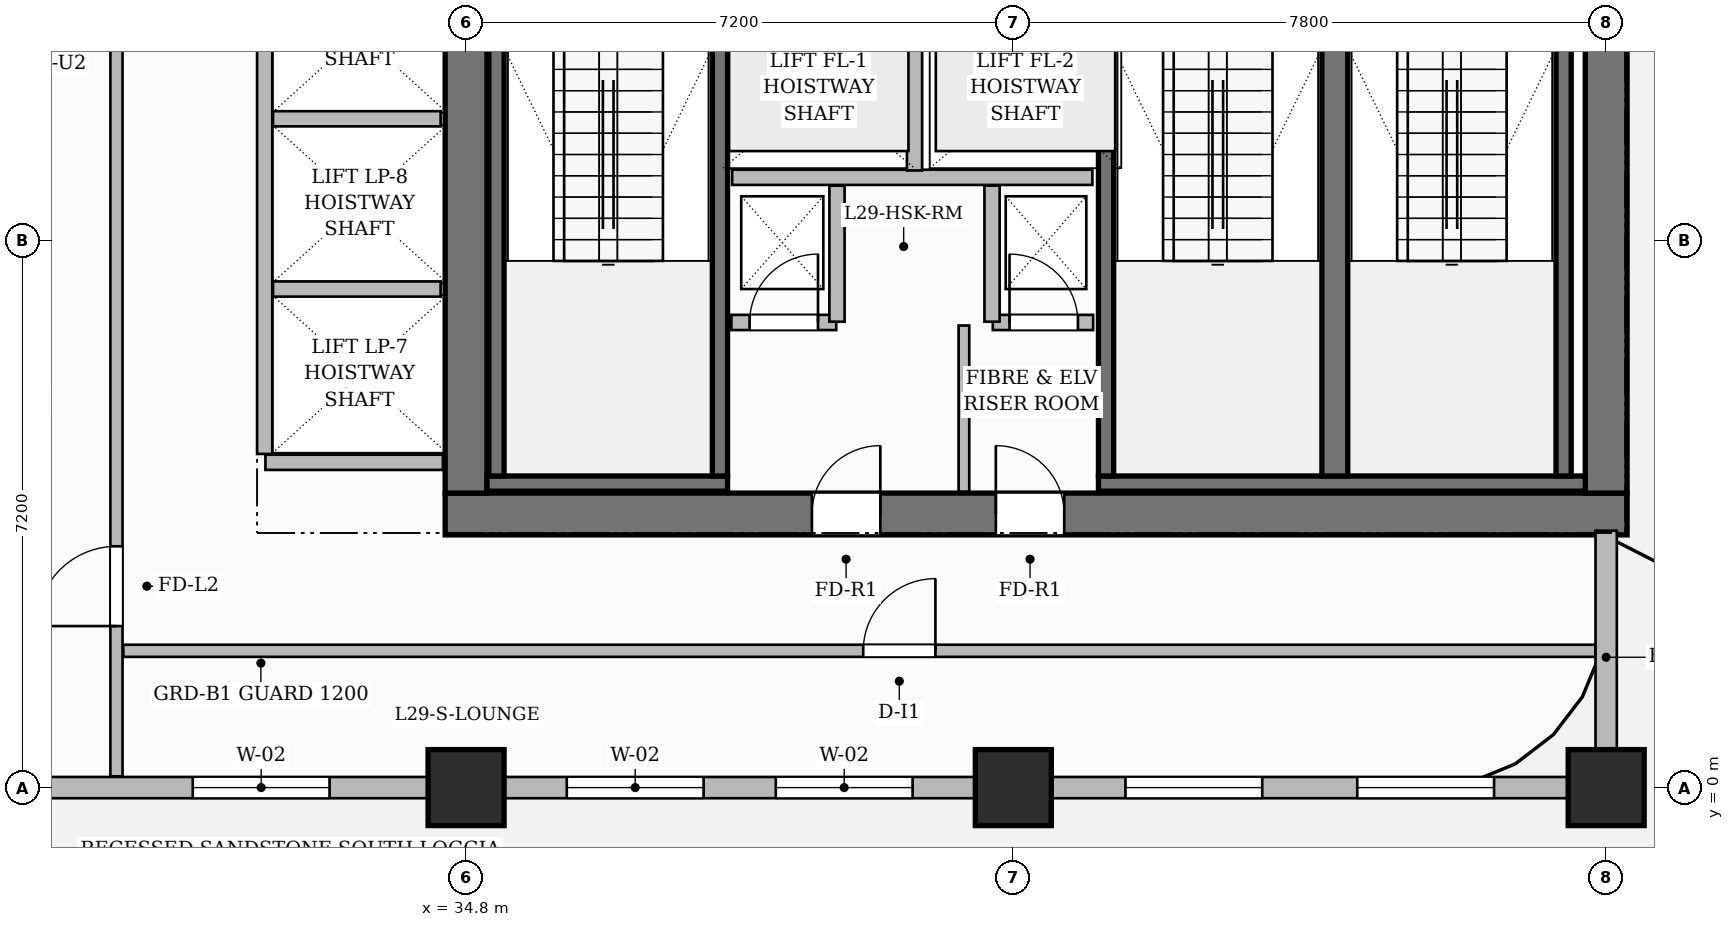
"""IFC4 building model, lengths in metres.
Left out: names, types, materials, properties, quantities, classifications, styles, units other than length and angle.
Written with IfcOpenShell. Run it as: python <this file> out.ifc"""

import sys

from ifc_helpers import new_model, si_unit, direction, frame, frame_2d, origin, origin_2d, place, context, subcontext, project, spatial, rectangle, extrude, source, transform, mapped, element, fill, save


model = new_model("IFC4")
c1 = context("Model", 3, precision=1e-05, world=origin(), true_north=direction((0.0, 1.0)))
c2 = subcontext(c1, "Body", "Model", "MODEL_VIEW")
j1 = project(units=[si_unit("LENGTHUNIT", "METRE"), si_unit("PLANEANGLEUNIT", "RADIAN")], contexts=[c1])
p1 = place(None, origin())
s1 = spatial("IfcSite", under=j1, at=p1, CompositionType="ELEMENT")
p2 = place(p1, origin())
s2 = spatial("IfcBuilding", under=s1, at=p2, CompositionType="ELEMENT")
p3 = place(p2, frame((0.0, 0.0, 119.2)))
s3 = spatial("IfcBuildingStorey", under=s2, at=p3, CompositionType="ELEMENT", Elevation=119.2)
p4 = place(p3, frame((34.525, 3.6, 0.0), z_axis=(0.0, 0.0, 1.0), x_axis=(1.0, 0.0, 0.0)))
e1 = element("IfcWall", 1, at=p4, inside=s3, PredefinedType="SHEAR", context=c2, shape_type="SweptSolid", body=[
    extrude(rectangle(XDim=15.55, YDim=0.55, at=frame_2d((7.775, 0.0))), origin(), (0.0, 0.0, 1.0), 3.7),
])
p5 = place(p4, frame((4.825, 0.0, 0.0)))
e2 = element("IfcOpeningElement", 2, at=p5, cuts=e1, PredefinedType="OPENING", context=c2, shape_type="SweptSolid", body=[
    extrude(rectangle(XDim=0.9, YDim=2.1, at=frame_2d((0.45, 1.05))), frame((0.0, 0.285, 0.0), z_axis=(0.0, -1.0, 0.0), x_axis=(1.0, 0.0, 0.0)), (0.0, 0.0, 1.0), 0.57),
])
p6 = place(p4, frame((7.245, 0.0, 0.0)))
e3 = element("IfcOpeningElement", 3, at=p6, cuts=e1, PredefinedType="OPENING", context=c2, shape_type="SweptSolid", body=[
    extrude(rectangle(XDim=0.9, YDim=2.1, at=frame_2d((0.45, 1.05))), frame((0.0, 0.285, 0.0), z_axis=(0.0, -1.0, 0.0), x_axis=(1.0, 0.0, 0.0)), (0.0, 0.0, 1.0), 0.57),
])
for number, where, z_axis, x_axis in (
    (4, (34.8, 3.875, 0.0), (0.0, 0.0, 1.0), (0.0, 1.0, 0.0)),
    (5, (49.8, 3.875, 0.0), (0.0, 0.0, 1.0), (0.0, 1.0, 0.0)),
):
    element("IfcWall", number, at=place(p3, frame(where, z_axis=z_axis, x_axis=x_axis)), inside=s3, PredefinedType="SHEAR", context=c2, shape_type="SweptSolid", body=[
        extrude(rectangle(XDim=10.25, YDim=0.55, at=frame_2d((5.125, 0.0))), origin(), (0.0, 0.0, 1.0), 3.7),
    ])
m1 = source(origin(), c2, "Body", "SweptSolid", [
    extrude(rectangle(XDim=1.0, YDim=1.0, at=origin_2d()), origin(), (0.0, 0.0, 1.0), 3.7),
])
for number, where, z_axis, x_axis in (
    (6, (34.8, 0.0, 0.0), (0.0, 0.0, 1.0), (1.0, 0.0, 0.0)),
    (7, (42.0, 0.0, 0.0), (0.0, 0.0, 1.0), (1.0, 0.0, 0.0)),
    (8, (49.8, 0.0, 0.0), (0.0, 0.0, 1.0), (1.0, 0.0, 0.0)),
):
    element("IfcColumn", number, at=place(p3, frame(where, z_axis=z_axis, x_axis=x_axis)), inside=s3, PredefinedType="COLUMN", context=c2, shape_type="MappedRepresentation", body=[
        mapped(m1, transform((0.0, 0.0, 0.0), scale=1.0)),
    ])
p7 = place(p3, frame((35.075, 4.0, 0.0), z_axis=(0.0, 0.0, 1.0), x_axis=(1.0, 0.0, 0.0)))
e9 = element("IfcWall", 9, at=p7, inside=s3, PredefinedType="SHEAR", context=c2, shape_type="SweptSolid", body=[
    extrude(rectangle(XDim=3.165, YDim=0.2, at=frame_2d((1.583, 0.0))), origin(), (0.0, 0.0, 1.0), 3.7),
])
for number, where, z_axis, x_axis in (
    (10, (35.2, 4.1, 0.0), (0.0, 0.0, 1.0), (0.0, 1.0, 0.0)),
    (11, (38.14, 4.1, 0.0), (0.0, 0.0, 1.0), (0.0, 1.0, 0.0)),
):
    element("IfcWall", number, at=place(p3, frame(where, z_axis=z_axis, x_axis=x_axis)), inside=s3, PredefinedType="SHEAR", context=c2, shape_type="SweptSolid", body=[
        extrude(rectangle(XDim=6.95, YDim=0.2, at=frame_2d((3.475, 0.0))), origin(), (0.0, 0.0, 1.0), 3.7),
    ])
p8 = place(p3, frame((43.12, 4.0, 0.0), z_axis=(0.0, 0.0, 1.0), x_axis=(1.0, 0.0, 0.0)))
e12 = element("IfcWall", 12, at=p8, inside=s3, PredefinedType="SHEAR", context=c2, shape_type="SweptSolid", body=[
    extrude(rectangle(XDim=6.405, YDim=0.2, at=frame_2d((3.202, 0.0))), origin(), (0.0, 0.0, 1.0), 3.7),
])
p9 = place(p3, frame((43.22, 4.1, 0.0), z_axis=(0.0, 0.0, 1.0), x_axis=(0.0, 1.0, 0.0)))
e13 = element("IfcWall", 13, at=p9, inside=s3, PredefinedType="SHEAR", context=c2, shape_type="SweptSolid", body=[
    extrude(rectangle(XDim=6.95, YDim=0.2, at=frame_2d((3.475, 0.0))), origin(), (0.0, 0.0, 1.0), 3.7),
])
p10 = place(p3, frame((46.23, 4.1, 0.0), z_axis=(0.0, 0.0, 1.0), x_axis=(0.0, 1.0, 0.0)))
e14 = element("IfcWall", 14, at=p10, inside=s3, PredefinedType="SHEAR", context=c2, shape_type="SweptSolid", body=[
    extrude(rectangle(XDim=6.95, YDim=0.34, at=frame_2d((3.475, 0.0))), origin(), (0.0, 0.0, 1.0), 3.7),
])
p11 = place(p3, frame((49.24, 4.1, 0.0), z_axis=(0.0, 0.0, 1.0), x_axis=(0.0, 1.0, 0.0)))
e15 = element("IfcWall", 15, at=p11, inside=s3, PredefinedType="SHEAR", context=c2, shape_type="SweptSolid", body=[
    extrude(rectangle(XDim=6.95, YDim=0.2, at=frame_2d((3.475, 0.0))), origin(), (0.0, 0.0, 1.0), 3.7),
])
p12 = place(p3, frame((38.3, 8.03, 0.0), z_axis=(0.0, 0.0, 1.0), x_axis=(1.0, 0.0, 0.0)))
e16 = element("IfcWall", 16, at=p12, inside=s3, PredefinedType="PARTITIONING", context=c2, shape_type="SweptSolid", body=[
    extrude(rectangle(XDim=4.74, YDim=0.2, at=frame_2d((2.37, 0.0))), origin(), (0.0, 0.0, 1.0), 3.45),
])
p13 = place(p3, frame((40.7, 8.12, 0.0), z_axis=(0.0, 0.0, 1.0), x_axis=(0.0, 1.0, 0.0)))
e17 = element("IfcWall", 17, at=p13, inside=s3, PredefinedType="PARTITIONING", context=c2, shape_type="SweptSolid", body=[
    extrude(rectangle(XDim=2.18, YDim=0.2, at=frame_2d((1.09, 0.0))), origin(), (0.0, 0.0, 1.0), 3.45),
])
p14 = place(p3, frame((38.29, 6.12, 0.0), z_axis=(0.0, 0.0, 1.0), x_axis=(1.0, 0.0, 0.0)))
e18 = element("IfcWall", 18, at=p14, inside=s3, PredefinedType="PARTITIONING", context=c2, shape_type="SweptSolid", body=[
    extrude(rectangle(XDim=1.38, YDim=0.2, at=frame_2d((0.69, 0.0))), origin(), (0.0, 0.0, 1.0), 3.45),
])
p15 = place(p14, frame((0.24, 0.0, 0.0)))
e19 = element("IfcOpeningElement", 19, at=p15, cuts=e18, PredefinedType="OPENING", context=c2, shape_type="SweptSolid", body=[
    extrude(rectangle(XDim=0.9, YDim=2.1, at=frame_2d((0.45, 1.05))), frame((0.0, 0.11, 0.0), z_axis=(0.0, -1.0, 0.0), x_axis=(1.0, 0.0, 0.0)), (0.0, 0.0, 1.0), 0.22),
])
p16 = place(p3, frame((39.68, 6.13, 0.0), z_axis=(0.0, 0.0, 1.0), x_axis=(0.0, 1.0, 0.0)))
e20 = element("IfcWall", 20, at=p16, inside=s3, PredefinedType="PARTITIONING", context=c2, shape_type="SweptSolid", body=[
    extrude(rectangle(XDim=1.79, YDim=0.2, at=frame_2d((0.895, 0.0))), origin(), (0.0, 0.0, 1.0), 3.45),
])
p17 = place(p3, frame((41.73, 6.12, 0.0), z_axis=(0.0, 0.0, 1.0), x_axis=(1.0, 0.0, 0.0)))
e21 = element("IfcWall", 21, at=p17, inside=s3, PredefinedType="PARTITIONING", context=c2, shape_type="SweptSolid", body=[
    extrude(rectangle(XDim=1.32, YDim=0.2, at=frame_2d((0.66, 0.0))), origin(), (0.0, 0.0, 1.0), 3.45),
])
p18 = place(p17, frame((0.22, 0.0, 0.0)))
e22 = element("IfcOpeningElement", 22, at=p18, cuts=e21, PredefinedType="OPENING", context=c2, shape_type="SweptSolid", body=[
    extrude(rectangle(XDim=0.9, YDim=2.1, at=frame_2d((0.45, 1.05))), frame((0.0, 0.11, 0.0), z_axis=(0.0, -1.0, 0.0), x_axis=(1.0, 0.0, 0.0)), (0.0, 0.0, 1.0), 0.22),
])
p19 = place(p3, frame((41.72, 6.13, 0.0), z_axis=(0.0, 0.0, 1.0), x_axis=(0.0, 1.0, 0.0)))
e23 = element("IfcWall", 23, at=p19, inside=s3, PredefinedType="PARTITIONING", context=c2, shape_type="SweptSolid", body=[
    extrude(rectangle(XDim=1.79, YDim=0.2, at=frame_2d((0.895, 0.0))), origin(), (0.0, 0.0, 1.0), 3.45),
])
p20 = place(p3, frame((41.35, 3.895, 0.0), z_axis=(0.0, 0.0, 1.0), x_axis=(0.0, 1.0, 0.0)))
e24 = element("IfcWall", 24, at=p20, inside=s3, PredefinedType="PARTITIONING", context=c2, shape_type="SweptSolid", body=[
    extrude(rectangle(XDim=2.185, YDim=0.14, at=frame_2d((1.093, 0.0))), origin(), (0.0, 0.0, 1.0), 3.45),
])
p21 = place(p3, frame((32.16, 4.28, 0.0), z_axis=(0.0, 0.0, 1.0), x_axis=(1.0, 0.0, 0.0)))
e25 = element("IfcWall", 25, at=p21, inside=s3, PredefinedType="PARTITIONING", context=c2, shape_type="SweptSolid", body=[
    extrude(rectangle(XDim=2.335, YDim=0.2, at=frame_2d((1.167, 0.0))), origin(), (0.0, 0.0, 1.0), 3.45),
])
p22 = place(p3, frame((32.15, 4.39, 0.0), z_axis=(0.0, 0.0, 1.0), x_axis=(0.0, 1.0, 0.0)))
e26 = element("IfcWall", 26, at=p22, inside=s3, PredefinedType="PARTITIONING", context=c2, shape_type="SweptSolid", body=[
    extrude(rectangle(XDim=8.82, YDim=0.2, at=frame_2d((4.41, 0.0))), origin(), (0.0, 0.0, 1.0), 3.45),
])
for number, where, z_axis, x_axis in (
    (27, (32.26, 6.56, 0.0), (0.0, 0.0, 1.0), (1.0, 0.0, 0.0)),
    (28, (32.26, 8.8, 0.0), (0.0, 0.0, 1.0), (1.0, 0.0, 0.0)),
):
    element("IfcWall", number, at=place(p3, frame(where, z_axis=z_axis, x_axis=x_axis)), inside=s3, PredefinedType="PARTITIONING", context=c2, shape_type="SweptSolid", body=[
        extrude(rectangle(XDim=2.205, YDim=0.2, at=frame_2d((1.103, 0.0))), origin(), (0.0, 0.0, 1.0), 3.45),
    ])
p23 = place(p3, frame((30.2, 0.148, 0.0), z_axis=(0.0, 0.0, 1.0), x_axis=(0.0, 1.0, 0.0)))
e29 = element("IfcWall", 29, at=p23, inside=s3, PredefinedType="PARTITIONING", context=c2, shape_type="SweptSolid", body=[
    extrude(rectangle(XDim=10.112, YDim=0.16, at=frame_2d((5.056, 0.0))), origin(), (0.0, 0.0, 1.0), 3.45),
])
p24 = place(p23, frame((1.977, 0.0, 0.0)))
e30 = element("IfcOpeningElement", 30, at=p24, cuts=e29, PredefinedType="OPENING", context=c2, shape_type="SweptSolid", body=[
    extrude(rectangle(XDim=1.05, YDim=2.15, at=frame_2d((0.525, 1.075))), frame((0.0, 0.09, 0.0), z_axis=(0.0, -1.0, 0.0), x_axis=(1.0, 0.0, 0.0)), (0.0, 0.0, 1.0), 0.18),
])
p25 = place(p3, frame((30.29, 1.8, 0.0), z_axis=(0.0, 0.0, 1.0), x_axis=(1.0, 0.0, 0.0)))
e31 = element("IfcWall", 31, at=p25, inside=s3, PredefinedType="PARTITIONING", context=c2, shape_type="SweptSolid", body=[
    extrude(rectangle(XDim=19.37, YDim=0.16, at=frame_2d((9.685, 0.0))), origin(), (0.0, 0.0, 1.0), 3.45),
])
p26 = place(p25, frame((9.735, 0.0, 0.0)))
e32 = element("IfcOpeningElement", 32, at=p26, cuts=e31, PredefinedType="OPENING", context=c2, shape_type="SweptSolid", body=[
    extrude(rectangle(XDim=0.95, YDim=2.15, at=frame_2d((0.475, 1.075))), frame((0.0, 0.09, 0.0), z_axis=(0.0, -1.0, 0.0), x_axis=(1.0, 0.0, 0.0)), (0.0, 0.0, 1.0), 0.18),
])
p27 = place(p3, frame((14.4, 0.0, 0.0), z_axis=(0.0, 0.0, 1.0), x_axis=(1.0, 0.0, 0.0)))
e33 = element("IfcWall", 33, at=p27, inside=s3, PredefinedType="SOLIDWALL", context=c2, shape_type="SweptSolid", body=[
    extrude(rectangle(XDim=35.4, YDim=0.28, at=frame_2d((17.7, 0.0))), origin(), (0.0, 0.0, 1.0), 2.935),
])
p28 = place(p27, frame((0.85, 0.0, 0.0)))
e34 = element("IfcOpeningElement", 34, at=p28, cuts=e33, PredefinedType="OPENING", context=c2, shape_type="SweptSolid", body=[
    extrude(rectangle(XDim=1.2, YDim=2.2, at=frame_2d((0.6, 1.1))), frame((0.0, 0.15, 0.0), z_axis=(0.0, -1.0, 0.0), x_axis=(1.0, 0.0, 0.0)), (0.0, 0.0, 1.0), 0.3),
])
p29 = place(p27, frame((2.671, 0.0, 0.8)))
e35 = element("IfcOpeningElement", 35, at=p29, cuts=e33, PredefinedType="OPENING", context=c2, shape_type="SweptSolid", body=[
    extrude(rectangle(XDim=0.95, YDim=1.75, at=frame_2d((0.475, 0.875))), frame((0.0, 0.15, 0.0), z_axis=(0.0, -1.0, 0.0), x_axis=(1.0, 0.0, 0.0)), (0.0, 0.0, 1.0), 0.3),
])
p30 = place(p27, frame((4.479, 0.0, 0.8)))
e36 = element("IfcOpeningElement", 36, at=p30, cuts=e33, PredefinedType="OPENING", context=c2, shape_type="SweptSolid", body=[
    extrude(rectangle(XDim=1.4, YDim=1.85, at=frame_2d((0.7, 0.925))), frame((0.0, 0.15, 0.0), z_axis=(0.0, -1.0, 0.0), x_axis=(1.0, 0.0, 0.0)), (0.0, 0.0, 1.0), 0.3),
])
p31 = place(p27, frame((8.181, 0.0, 0.8)))
e37 = element("IfcOpeningElement", 37, at=p31, cuts=e33, PredefinedType="OPENING", context=c2, shape_type="SweptSolid", body=[
    extrude(rectangle(XDim=0.95, YDim=1.75, at=frame_2d((0.475, 0.875))), frame((0.0, 0.15, 0.0), z_axis=(0.0, -1.0, 0.0), x_axis=(1.0, 0.0, 0.0)), (0.0, 0.0, 1.0), 0.3),
])
p32 = place(p27, frame((9.845, 0.0, 0.8)))
e38 = element("IfcOpeningElement", 38, at=p32, cuts=e33, PredefinedType="OPENING", context=c2, shape_type="SweptSolid", body=[
    extrude(rectangle(XDim=1.8, YDim=1.85, at=frame_2d((0.9, 0.925))), frame((0.0, 0.15, 0.0), z_axis=(0.0, -1.0, 0.0), x_axis=(1.0, 0.0, 0.0)), (0.0, 0.0, 1.0), 0.3),
])
p33 = place(p27, frame((12.414, 0.0, 0.8)))
e39 = element("IfcOpeningElement", 39, at=p33, cuts=e33, PredefinedType="OPENING", context=c2, shape_type="SweptSolid", body=[
    extrude(rectangle(XDim=0.95, YDim=1.75, at=frame_2d((0.475, 0.875))), frame((0.0, 0.15, 0.0), z_axis=(0.0, -1.0, 0.0), x_axis=(1.0, 0.0, 0.0)), (0.0, 0.0, 1.0), 0.3),
])
p34 = place(p27, frame((16.804, 0.0, 0.8)))
e40 = element("IfcOpeningElement", 40, at=p34, cuts=e33, PredefinedType="OPENING", context=c2, shape_type="SweptSolid", body=[
    extrude(rectangle(XDim=1.8, YDim=1.85, at=frame_2d((0.9, 0.925))), frame((0.0, 0.15, 0.0), z_axis=(0.0, -1.0, 0.0), x_axis=(1.0, 0.0, 0.0)), (0.0, 0.0, 1.0), 0.3),
])
p35 = place(p27, frame((21.725, 0.0, 0.8)))
e41 = element("IfcOpeningElement", 41, at=p35, cuts=e33, PredefinedType="OPENING", context=c2, shape_type="SweptSolid", body=[
    extrude(rectangle(XDim=1.8, YDim=1.85, at=frame_2d((0.9, 0.925))), frame((0.0, 0.15, 0.0), z_axis=(0.0, -1.0, 0.0), x_axis=(1.0, 0.0, 0.0)), (0.0, 0.0, 1.0), 0.3),
])
p36 = place(p27, frame((24.475, 0.0, 0.8)))
e42 = element("IfcOpeningElement", 42, at=p36, cuts=e33, PredefinedType="OPENING", context=c2, shape_type="SweptSolid", body=[
    extrude(rectangle(XDim=1.8, YDim=1.85, at=frame_2d((0.9, 0.925))), frame((0.0, 0.15, 0.0), z_axis=(0.0, -1.0, 0.0), x_axis=(1.0, 0.0, 0.0)), (0.0, 0.0, 1.0), 0.3),
])
p37 = place(p27, frame((29.075, 0.0, 0.8)))
e43 = element("IfcOpeningElement", 43, at=p37, cuts=e33, PredefinedType="OPENING", context=c2, shape_type="SweptSolid", body=[
    extrude(rectangle(XDim=1.8, YDim=1.85, at=frame_2d((0.9, 0.925))), frame((0.0, 0.15, 0.0), z_axis=(0.0, -1.0, 0.0), x_axis=(1.0, 0.0, 0.0)), (0.0, 0.0, 1.0), 0.3),
])
p38 = place(p27, frame((32.125, 0.0, 0.8)))
e44 = element("IfcOpeningElement", 44, at=p38, cuts=e33, PredefinedType="OPENING", context=c2, shape_type="SweptSolid", body=[
    extrude(rectangle(XDim=1.8, YDim=1.85, at=frame_2d((0.9, 0.925))), frame((0.0, 0.15, 0.0), z_axis=(0.0, -1.0, 0.0), x_axis=(1.0, 0.0, 0.0)), (0.0, 0.0, 1.0), 0.3),
])
p39 = place(p3, frame((49.8, 0.05, 0.0), z_axis=(0.0, 0.0, 1.0), x_axis=(0.0, 1.0, 0.0)))
e45 = element("IfcWall", 45, at=p39, inside=s3, PredefinedType="SOLIDWALL", context=c2, shape_type="SweptSolid", body=[
    extrude(rectangle(XDim=3.33, YDim=0.28, at=frame_2d((1.665, 0.0))), origin(), (0.0, 0.0, 1.0), 3.45),
])
m2 = source(origin(), c2, "Body", "SweptSolid", [
    extrude(rectangle(XDim=0.9, YDim=2.1, at=frame_2d((0.45, 1.05))), frame((0.0, 0.025, 0.0), z_axis=(0.0, -1.0, 0.0), x_axis=(1.0, 0.0, 0.0)), (0.0, 0.0, 1.0), 0.05),
])
p40 = place(p15, origin())
e46 = element("IfcDoor", 46, at=p40, inside=s3, OperationType="SINGLE_SWING_RIGHT", PredefinedType="DOOR", context=c2, shape_type="MappedRepresentation", body=[
    mapped(m2, transform((0.0, 0.0, 0.0), scale=1.0)),
])
fill(e19, e46)
p41 = place(p18, origin())
e47 = element("IfcDoor", 47, at=p41, inside=s3, OperationType="SINGLE_SWING_LEFT", PredefinedType="DOOR", context=c2, shape_type="MappedRepresentation", body=[
    mapped(m2, transform((0.0, 0.0, 0.0), scale=1.0)),
])
fill(e22, e47)
p42 = place(p5, origin())
e48 = element("IfcDoor", 48, at=p42, inside=s3, OperationType="SINGLE_SWING_RIGHT", PredefinedType="DOOR", context=c2, shape_type="MappedRepresentation", body=[
    mapped(m2, transform((0.0, 0.0, 0.0), scale=1.0)),
])
fill(e2, e48)
p43 = place(p6, origin())
e49 = element("IfcDoor", 49, at=p43, inside=s3, OperationType="SINGLE_SWING_LEFT", PredefinedType="DOOR", context=c2, shape_type="MappedRepresentation", body=[
    mapped(m2, transform((0.0, 0.0, 0.0), scale=1.0)),
])
fill(e3, e49)
m3 = source(origin(), c2, "Body", "SweptSolid", [
    extrude(rectangle(XDim=1.05, YDim=2.15, at=frame_2d((0.525, 1.075))), frame((0.0, 0.025, 0.0), z_axis=(0.0, -1.0, 0.0), x_axis=(1.0, 0.0, 0.0)), (0.0, 0.0, 1.0), 0.05),
])
p44 = place(p24, origin())
e50 = element("IfcDoor", 50, at=p44, inside=s3, OperationType="SINGLE_SWING_LEFT", PredefinedType="DOOR", context=c2, shape_type="MappedRepresentation", body=[
    mapped(m3, transform((0.0, 0.0, 0.0), scale=1.0)),
])
fill(e30, e50)
m4 = source(origin(), c2, "Body", "SweptSolid", [
    extrude(rectangle(XDim=0.95, YDim=2.15, at=frame_2d((0.475, 1.075))), frame((0.0, 0.025, 0.0), z_axis=(0.0, -1.0, 0.0), x_axis=(1.0, 0.0, 0.0)), (0.0, 0.0, 1.0), 0.05),
])
p45 = place(p26, origin())
e51 = element("IfcDoor", 51, at=p45, inside=s3, OperationType="SINGLE_SWING_RIGHT", PredefinedType="DOOR", context=c2, shape_type="MappedRepresentation", body=[
    mapped(m4, transform((0.0, 0.0, 0.0), scale=1.0)),
])
fill(e32, e51)
m5 = source(origin(), c2, "Body", "SweptSolid", [
    extrude(rectangle(XDim=1.8, YDim=1.85, at=frame_2d((0.9, 0.925))), frame((0.0, 0.03, 0.0), z_axis=(0.0, -1.0, 0.0), x_axis=(1.0, 0.0, 0.0)), (0.0, 0.0, 1.0), 0.06),
])
p46 = place(p34, origin())
e52 = element("IfcWindow", 52, at=p46, inside=s3, PartitioningType="DOUBLE_PANEL_VERTICAL", PredefinedType="WINDOW", context=c2, shape_type="MappedRepresentation", body=[
    mapped(m5, transform((0.0, 0.0, 0.0), scale=1.0)),
])
fill(e40, e52)
p47 = place(p35, origin())
e53 = element("IfcWindow", 53, at=p47, inside=s3, PartitioningType="DOUBLE_PANEL_VERTICAL", PredefinedType="WINDOW", context=c2, shape_type="MappedRepresentation", body=[
    mapped(m5, transform((0.0, 0.0, 0.0), scale=1.0)),
])
fill(e41, e53)
p48 = place(p36, origin())
e54 = element("IfcWindow", 54, at=p48, inside=s3, PartitioningType="DOUBLE_PANEL_VERTICAL", PredefinedType="WINDOW", context=c2, shape_type="MappedRepresentation", body=[
    mapped(m5, transform((0.0, 0.0, 0.0), scale=1.0)),
])
fill(e42, e54)
p49 = place(p37, origin())
e55 = element("IfcWindow", 55, at=p49, inside=s3, PartitioningType="DOUBLE_PANEL_VERTICAL", PredefinedType="WINDOW", context=c2, shape_type="MappedRepresentation", body=[
    mapped(m5, transform((0.0, 0.0, 0.0), scale=1.0)),
])
fill(e43, e55)
p50 = place(p38, origin())
e56 = element("IfcWindow", 56, at=p50, inside=s3, PartitioningType="DOUBLE_PANEL_VERTICAL", PredefinedType="WINDOW", context=c2, shape_type="MappedRepresentation", body=[
    mapped(m5, transform((0.0, 0.0, 0.0), scale=1.0)),
])
fill(e44, e56)
save(model, sys.argv[1])
